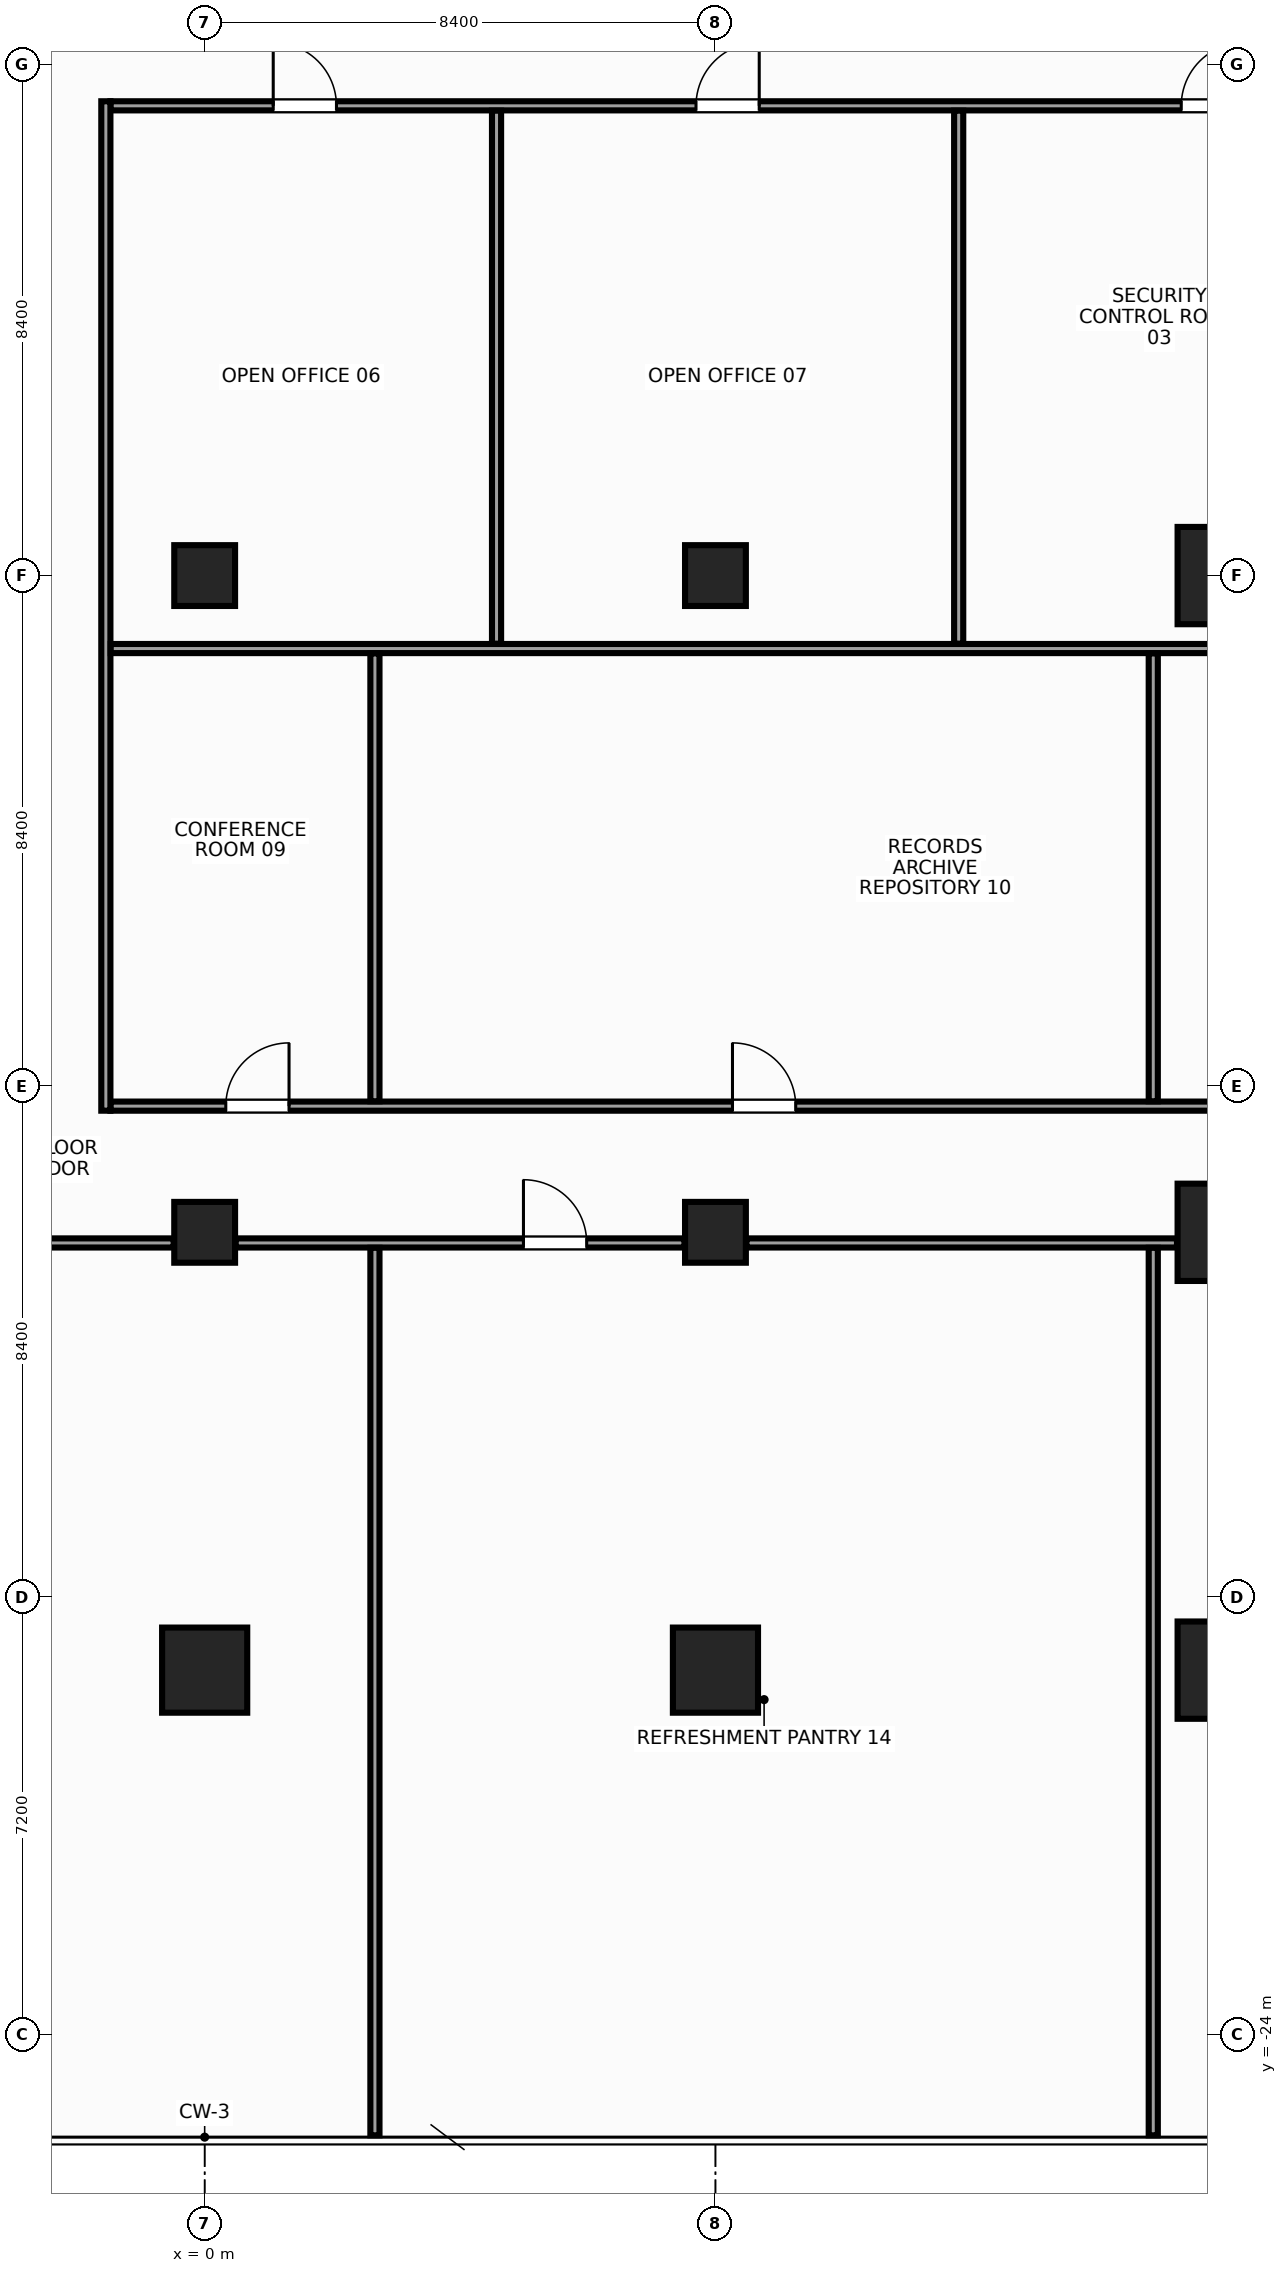
"""IFC4 building model, lengths in metres.
Left out: names, types, materials, properties, quantities, classifications, styles, units other than length and angle.
Written with IfcOpenShell. Run it as: python <this file> out.ifc"""

import sys

from ifc_helpers import new_model, si_unit, direction, frame, frame_2d, origin, origin_2d, place, context, subcontext, project, spatial, rectangle, hollow_rectangle, extrude, source, transform, mapped, element, fill, save


model = new_model("IFC4")
c1 = context("Model", 3, precision=1e-05, world=origin(), true_north=direction((0.0, 1.0)))
c2 = subcontext(c1, "Body", "Model", "MODEL_VIEW")
j1 = project(units=[si_unit("LENGTHUNIT", "METRE"), si_unit("PLANEANGLEUNIT", "RADIAN")], contexts=[c1])
p1 = place(None, origin())
s1 = spatial("IfcSite", under=j1, at=p1, CompositionType="ELEMENT")
p2 = place(p1, origin())
s2 = spatial("IfcBuilding", under=s1, at=p2, CompositionType="ELEMENT")
p3 = place(p2, frame((0.0, 0.0, 99.2)))
s3 = spatial("IfcBuildingStorey", under=s2, at=p3, CompositionType="ELEMENT", Elevation=99.2)
m1 = source(origin(), c2, "Body", "SweptSolid", [
    extrude(rectangle(XDim=1.6, YDim=1.6, at=origin_2d()), origin(), (0.0, 0.0, 1.0), 3.6),
])
for number, where, z_axis, x_axis in (
    (1, (16.8, -18.0, 0.0), (0.0, 0.0, 1.0), (1.0, 0.0, 0.0)),
    (2, (16.8, -10.8, 0.0), (0.0, 0.0, 1.0), (1.0, 0.0, 0.0)),
    (3, (16.8, 0.0, 0.0), (0.0, 0.0, 1.0), (1.0, 0.0, 0.0)),
):
    element("IfcColumn", number, at=place(p3, frame(where, z_axis=z_axis, x_axis=x_axis)), inside=s3, PredefinedType="COLUMN", context=c2, shape_type="MappedRepresentation", body=[
        mapped(m1, transform((0.0, 0.0, 0.0), x_axis=(1.0, 0.0, 0.0), y_axis=(0.0, 1.0, 0.0), z_axis=(0.0, 0.0, 1.0), scale=1.0)),
    ])
m2 = source(origin(), c2, "Body", "SweptSolid", [
    extrude(rectangle(XDim=1.4, YDim=1.4, at=origin_2d()), origin(), (0.0, 0.0, 1.0), 3.6),
])
p4 = place(p3, frame((8.4, -18.0, 0.0), z_axis=(0.0, 0.0, 1.0), x_axis=(1.0, 0.0, 0.0)))
e4 = element("IfcColumn", 4, at=p4, inside=s3, PredefinedType="COLUMN", context=c2, shape_type="MappedRepresentation", body=[
    mapped(m2, transform((0.0, 0.0, 0.0), x_axis=(1.0, 0.0, 0.0), y_axis=(0.0, 1.0, 0.0), z_axis=(0.0, 0.0, 1.0), scale=1.0)),
])
m3 = source(origin(), c2, "Body", "SweptSolid", [
    extrude(hollow_rectangle(XDim=1.0, YDim=1.0, WallThickness=0.045, at=origin_2d()), origin(), (0.0, 0.0, 1.0), 3.6),
])
for number, where, z_axis, x_axis in (
    (5, (8.4, 0.0, 0.0), (0.0, 0.0, 1.0), (1.0, 0.0, 0.0)),
    (6, (8.4, -10.8, 0.0), (0.0, 0.0, 1.0), (1.0, 0.0, 0.0)),
):
    element("IfcColumn", number, at=place(p3, frame(where, z_axis=z_axis, x_axis=x_axis)), inside=s3, PredefinedType="COLUMN", context=c2, shape_type="MappedRepresentation", body=[
        mapped(m3, transform((0.0, 0.0, 0.0), x_axis=(1.0, 0.0, 0.0), y_axis=(0.0, 1.0, 0.0), z_axis=(0.0, 0.0, 1.0), scale=1.0)),
    ])
p5 = place(p3, frame((0.0, -18.0, 0.0), z_axis=(0.0, 0.0, 1.0), x_axis=(1.0, 0.0, 0.0)))
e7 = element("IfcColumn", 7, at=p5, inside=s3, PredefinedType="COLUMN", context=c2, shape_type="MappedRepresentation", body=[
    mapped(m2, transform((0.0, 0.0, 0.0), x_axis=(1.0, 0.0, 0.0), y_axis=(0.0, 1.0, 0.0), z_axis=(0.0, 0.0, 1.0), scale=1.0)),
])
m4 = source(origin(), c2, "Body", "SweptSolid", [
    extrude(rectangle(XDim=1.0, YDim=1.0, at=origin_2d()), origin(), (0.0, 0.0, 1.0), 3.6),
])
for number, where, z_axis, x_axis in (
    (8, (0.0, -10.8, 0.0), (0.0, 0.0, 1.0), (1.0, 0.0, 0.0)),
    (9, (0.0, 0.0, 0.0), (0.0, 0.0, 1.0), (1.0, 0.0, 0.0)),
):
    element("IfcColumn", number, at=place(p3, frame(where, z_axis=z_axis, x_axis=x_axis)), inside=s3, PredefinedType="COLUMN", context=c2, shape_type="MappedRepresentation", body=[
        mapped(m4, transform((0.0, 0.0, 0.0), x_axis=(1.0, 0.0, 0.0), y_axis=(0.0, 1.0, 0.0), z_axis=(0.0, 0.0, 1.0), scale=1.0)),
    ])
m5 = source(origin(), c2, "Body", "SweptSolid", [
    extrude(rectangle(XDim=22.3, YDim=0.15, at=frame_2d((11.15, 0.0))), origin(), (0.0, 0.0, 1.0), 2.745),
])
p6 = place(p3, frame((-1.55, 7.725, 0.0), z_axis=(0.0, 0.0, 1.0), x_axis=(1.0, 0.0, 0.0)))
e10 = element("IfcWall", 10, at=p6, inside=s3, PredefinedType="PARTITIONING", context=c2, shape_type="MappedRepresentation", body=[
    mapped(m5, transform((0.0, 0.0, 0.0), x_axis=(1.0, 0.0, 0.0), y_axis=(0.0, 1.0, 0.0), z_axis=(0.0, 0.0, 1.0), scale=1.0)),
])
p7 = place(p6, frame((20.952, 0.0, 0.0)))
e11 = element("IfcOpeningElement", 11, at=p7, cuts=e10, PredefinedType="OPENING", context=c2, shape_type="SweptSolid", body=[
    extrude(rectangle(XDim=0.9, YDim=2.15, at=frame_2d((0.45, 1.075))), frame((0.0, 0.087, 0.0), z_axis=(0.0, -1.0, 0.0), x_axis=(1.0, 0.0, 0.0)), (0.0, 0.0, 1.0), 0.174),
])
p8 = place(p6, frame((17.61, 0.0, 0.0)))
e12 = element("IfcOpeningElement", 12, at=p8, cuts=e10, PredefinedType="OPENING", context=c2, shape_type="SweptSolid", body=[
    extrude(rectangle(XDim=1.04, YDim=2.2, at=frame_2d((0.52, 1.1))), frame((0.0, 0.087, 0.0), z_axis=(0.0, -1.0, 0.0), x_axis=(1.0, 0.0, 0.0)), (0.0, 0.0, 1.0), 0.174),
])
p9 = place(p6, frame((2.677, 0.0, 0.0)))
e13 = element("IfcOpeningElement", 13, at=p9, cuts=e10, PredefinedType="OPENING", context=c2, shape_type="SweptSolid", body=[
    extrude(rectangle(XDim=1.04, YDim=2.2, at=frame_2d((0.52, 1.1))), frame((0.0, 0.087, 0.0), z_axis=(0.0, -1.0, 0.0), x_axis=(1.0, 0.0, 0.0)), (0.0, 0.0, 1.0), 0.174),
])
p10 = place(p6, frame((9.63, 0.0, 0.0)))
e14 = element("IfcOpeningElement", 14, at=p10, cuts=e10, PredefinedType="OPENING", context=c2, shape_type="SweptSolid", body=[
    extrude(rectangle(XDim=1.04, YDim=2.2, at=frame_2d((0.52, 1.1))), frame((0.0, 0.087, 0.0), z_axis=(0.0, -1.0, 0.0), x_axis=(1.0, 0.0, 0.0)), (0.0, 0.0, 1.0), 0.174),
])
p11 = place(p3, frame((-1.55, -8.725, 0.0), z_axis=(0.0, 0.0, 1.0), x_axis=(1.0, 0.0, 0.0)))
e15 = element("IfcWall", 15, at=p11, inside=s3, PredefinedType="PARTITIONING", context=c2, shape_type="MappedRepresentation", body=[
    mapped(m5, transform((0.0, 0.0, 0.0), x_axis=(1.0, 0.0, 0.0), y_axis=(0.0, 1.0, 0.0), z_axis=(0.0, 0.0, 1.0), scale=1.0)),
])
p12 = place(p11, frame((1.897, 0.0, 0.0)))
e16 = element("IfcOpeningElement", 16, at=p12, cuts=e15, PredefinedType="OPENING", context=c2, shape_type="SweptSolid", body=[
    extrude(rectangle(XDim=1.04, YDim=2.2, at=frame_2d((0.52, 1.1))), frame((0.0, 0.087, 0.0), z_axis=(0.0, -1.0, 0.0), x_axis=(1.0, 0.0, 0.0)), (0.0, 0.0, 1.0), 0.174),
])
p13 = place(p11, frame((10.23, 0.0, 0.0)))
e17 = element("IfcOpeningElement", 17, at=p13, cuts=e15, PredefinedType="OPENING", context=c2, shape_type="SweptSolid", body=[
    extrude(rectangle(XDim=1.04, YDim=2.2, at=frame_2d((0.52, 1.1))), frame((0.0, 0.087, 0.0), z_axis=(0.0, -1.0, 0.0), x_axis=(1.0, 0.0, 0.0)), (0.0, 0.0, 1.0), 0.174),
])
m6 = source(origin(), c2, "Body", "SweptSolid", [
    extrude(rectangle(XDim=7.38, YDim=0.15, at=frame_2d((3.69, 0.0))), origin(), (0.0, 0.0, 1.0), 2.745),
])
p14 = place(p3, frame((-7.89, -10.975, 0.0), z_axis=(0.0, 0.0, 1.0), x_axis=(1.0, 0.0, 0.0)))
e18 = element("IfcWall", 18, at=p14, inside=s3, PredefinedType="PARTITIONING", context=c2, shape_type="MappedRepresentation", body=[
    mapped(m6, transform((0.0, 0.0, 0.0), x_axis=(1.0, 0.0, 0.0), y_axis=(0.0, 1.0, 0.0), z_axis=(0.0, 0.0, 1.0), scale=1.0)),
])
p15 = place(p3, frame((0.51, -10.975, 0.0), z_axis=(0.0, 0.0, 1.0), x_axis=(1.0, 0.0, 0.0)))
e19 = element("IfcWall", 19, at=p15, inside=s3, PredefinedType="PARTITIONING", context=c2, shape_type="MappedRepresentation", body=[
    mapped(m6, transform((0.0, 0.0, 0.0), x_axis=(1.0, 0.0, 0.0), y_axis=(0.0, 1.0, 0.0), z_axis=(0.0, 0.0, 1.0), scale=1.0)),
])
p16 = place(p15, frame((4.732, 0.0, 0.0)))
e20 = element("IfcOpeningElement", 20, at=p16, cuts=e19, PredefinedType="OPENING", context=c2, shape_type="SweptSolid", body=[
    extrude(rectangle(XDim=1.04, YDim=2.2, at=frame_2d((0.52, 1.1))), frame((0.0, 0.087, 0.0), z_axis=(0.0, -1.0, 0.0), x_axis=(1.0, 0.0, 0.0)), (0.0, 0.0, 1.0), 0.174),
])
m7 = source(origin(), c2, "Body", "SweptSolid", [
    extrude(rectangle(XDim=7.08, YDim=0.15, at=frame_2d((3.54, 0.0))), origin(), (0.0, 0.0, 1.0), 2.745),
])
p17 = place(p3, frame((8.91, -10.975, 0.0), z_axis=(0.0, 0.0, 1.0), x_axis=(1.0, 0.0, 0.0)))
e21 = element("IfcWall", 21, at=p17, inside=s3, PredefinedType="PARTITIONING", context=c2, shape_type="MappedRepresentation", body=[
    mapped(m7, transform((0.0, 0.0, 0.0), x_axis=(1.0, 0.0, 0.0), y_axis=(0.0, 1.0, 0.0), z_axis=(0.0, 0.0, 1.0), scale=1.0)),
])
m8 = source(origin(), c2, "Body", "SweptSolid", [
    extrude(rectangle(XDim=16.6, YDim=0.15, at=frame_2d((8.3, 0.0))), origin(), (0.0, 0.0, 1.0), 2.645),
])
p18 = place(p3, frame((-1.625, -8.8, 0.0), z_axis=(0.0, 0.0, 1.0), x_axis=(0.0, 1.0, 0.0)))
e22 = element("IfcWall", 22, at=p18, inside=s3, PredefinedType="PARTITIONING", context=c2, shape_type="MappedRepresentation", body=[
    mapped(m8, transform((0.0, 0.0, 0.0), x_axis=(1.0, 0.0, 0.0), y_axis=(0.0, 1.0, 0.0), z_axis=(0.0, 0.0, 1.0), scale=1.0)),
])
m9 = source(origin(), c2, "Body", "SweptSolid", [
    extrude(rectangle(XDim=26.895, YDim=0.15, at=frame_2d((13.448, 0.0))), origin(), (0.0, 0.0, 1.0), 2.745),
])
p19 = place(p3, frame((-1.545, -1.2, 0.0), z_axis=(0.0, 0.0, 1.0), x_axis=(1.0, 0.0, 0.0)))
e23 = element("IfcWall", 23, at=p19, inside=s3, PredefinedType="PARTITIONING", context=c2, shape_type="MappedRepresentation", body=[
    mapped(m9, transform((0.0, 0.0, 0.0), x_axis=(1.0, 0.0, 0.0), y_axis=(0.0, 1.0, 0.0), z_axis=(0.0, 0.0, 1.0), scale=1.0)),
])
m10 = source(origin(), c2, "Body", "SweptSolid", [
    extrude(rectangle(XDim=8.765, YDim=0.15, at=frame_2d((4.383, 0.0))), origin(), (0.0, 0.0, 1.0), 2.645),
])
for number, where, z_axis, x_axis in (
    (24, (4.8, -1.12, 0.0), (0.0, 0.0, 1.0), (0.0, 1.0, 0.0)),
    (25, (12.4, -1.12, 0.0), (0.0, 0.0, 1.0), (0.0, 1.0, 0.0)),
):
    element("IfcWall", number, at=place(p3, frame(where, z_axis=z_axis, x_axis=x_axis)), inside=s3, PredefinedType="PARTITIONING", context=c2, shape_type="MappedRepresentation", body=[
        mapped(m10, transform((0.0, 0.0, 0.0), x_axis=(1.0, 0.0, 0.0), y_axis=(0.0, 1.0, 0.0), z_axis=(0.0, 0.0, 1.0), scale=1.0)),
    ])
m11 = source(origin(), c2, "Body", "SweptSolid", [
    extrude(rectangle(XDim=14.595, YDim=0.15, at=frame_2d((7.297, 0.0))), origin(), (0.0, 0.0, 1.0), 2.745),
])
p20 = place(p3, frame((2.8, -25.65, 0.0), z_axis=(0.0, 0.0, 1.0), x_axis=(0.0, 1.0, 0.0)))
e26 = element("IfcWall", 26, at=p20, inside=s3, PredefinedType="PARTITIONING", context=c2, shape_type="MappedRepresentation", body=[
    mapped(m11, transform((0.0, 0.0, 0.0), x_axis=(1.0, 0.0, 0.0), y_axis=(0.0, 1.0, 0.0), z_axis=(0.0, 0.0, 1.0), scale=1.0)),
])
m12 = source(origin(), c2, "Body", "SweptSolid", [
    extrude(rectangle(XDim=7.365, YDim=0.15, at=frame_2d((3.683, 0.0))), origin(), (0.0, 0.0, 1.0), 3.36),
])
p21 = place(p3, frame((2.8, -8.645, 0.0), z_axis=(0.0, 0.0, 1.0), x_axis=(0.0, 1.0, 0.0)))
e27 = element("IfcWall", 27, at=p21, inside=s3, PredefinedType="PARTITIONING", context=c2, shape_type="MappedRepresentation", body=[
    mapped(m12, transform((0.0, 0.0, 0.0), x_axis=(1.0, 0.0, 0.0), y_axis=(0.0, 1.0, 0.0), z_axis=(0.0, 0.0, 1.0), scale=1.0)),
])
p22 = place(p3, frame((15.6, -25.65, 0.0), z_axis=(0.0, 0.0, 1.0), x_axis=(0.0, 1.0, 0.0)))
e28 = element("IfcWall", 28, at=p22, inside=s3, PredefinedType="PARTITIONING", context=c2, shape_type="MappedRepresentation", body=[
    mapped(m11, transform((0.0, 0.0, 0.0), x_axis=(1.0, 0.0, 0.0), y_axis=(0.0, 1.0, 0.0), z_axis=(0.0, 0.0, 1.0), scale=1.0)),
])
p23 = place(p3, frame((15.6, -8.645, 0.0), z_axis=(0.0, 0.0, 1.0), x_axis=(0.0, 1.0, 0.0)))
e29 = element("IfcWall", 29, at=p23, inside=s3, PredefinedType="PARTITIONING", context=c2, shape_type="MappedRepresentation", body=[
    mapped(m12, transform((0.0, 0.0, 0.0), x_axis=(1.0, 0.0, 0.0), y_axis=(0.0, 1.0, 0.0), z_axis=(0.0, 0.0, 1.0), scale=1.0)),
])
m13 = source(origin(), c2, "Body", "SweptSolid", [
    extrude(rectangle(XDim=1.04, YDim=2.2, at=frame_2d((0.52, 1.1))), frame((0.0, 0.025, 0.0), z_axis=(0.0, -1.0, 0.0), x_axis=(1.0, 0.0, 0.0)), (0.0, 0.0, 1.0), 0.05),
])
p24 = place(p8, origin())
e30 = element("IfcDoor", 30, at=p24, inside=s3, OperationType="SINGLE_SWING_RIGHT", PredefinedType="DOOR", context=c2, shape_type="MappedRepresentation", body=[
    mapped(m13, transform((0.0, 0.0, 0.0), x_axis=(1.0, 0.0, 0.0), y_axis=(0.0, 1.0, 0.0), z_axis=(0.0, 0.0, 1.0), scale=1.0)),
])
fill(e12, e30)
p25 = place(p9, origin())
e31 = element("IfcDoor", 31, at=p25, inside=s3, OperationType="SINGLE_SWING_LEFT", PredefinedType="DOOR", context=c2, shape_type="MappedRepresentation", body=[
    mapped(m13, transform((0.0, 0.0, 0.0), x_axis=(1.0, 0.0, 0.0), y_axis=(0.0, 1.0, 0.0), z_axis=(0.0, 0.0, 1.0), scale=1.0)),
])
fill(e13, e31)
p26 = place(p10, origin())
e32 = element("IfcDoor", 32, at=p26, inside=s3, OperationType="SINGLE_SWING_RIGHT", PredefinedType="DOOR", context=c2, shape_type="MappedRepresentation", body=[
    mapped(m13, transform((0.0, 0.0, 0.0), x_axis=(1.0, 0.0, 0.0), y_axis=(0.0, 1.0, 0.0), z_axis=(0.0, 0.0, 1.0), scale=1.0)),
])
fill(e14, e32)
p27 = place(p12, origin())
e33 = element("IfcDoor", 33, at=p27, inside=s3, OperationType="SINGLE_SWING_RIGHT", PredefinedType="DOOR", context=c2, shape_type="MappedRepresentation", body=[
    mapped(m13, transform((0.0, 0.0, 0.0), x_axis=(1.0, 0.0, 0.0), y_axis=(0.0, 1.0, 0.0), z_axis=(0.0, 0.0, 1.0), scale=1.0)),
])
fill(e16, e33)
p28 = place(p13, origin())
e34 = element("IfcDoor", 34, at=p28, inside=s3, OperationType="SINGLE_SWING_LEFT", PredefinedType="DOOR", context=c2, shape_type="MappedRepresentation", body=[
    mapped(m13, transform((0.0, 0.0, 0.0), x_axis=(1.0, 0.0, 0.0), y_axis=(0.0, 1.0, 0.0), z_axis=(0.0, 0.0, 1.0), scale=1.0)),
])
fill(e17, e34)
p29 = place(p16, origin())
e35 = element("IfcDoor", 35, at=p29, inside=s3, OperationType="SINGLE_SWING_LEFT", PredefinedType="DOOR", context=c2, shape_type="MappedRepresentation", body=[
    mapped(m13, transform((0.0, 0.0, 0.0), x_axis=(1.0, 0.0, 0.0), y_axis=(0.0, 1.0, 0.0), z_axis=(0.0, 0.0, 1.0), scale=1.0)),
])
fill(e20, e35)
save(model, sys.argv[1])
